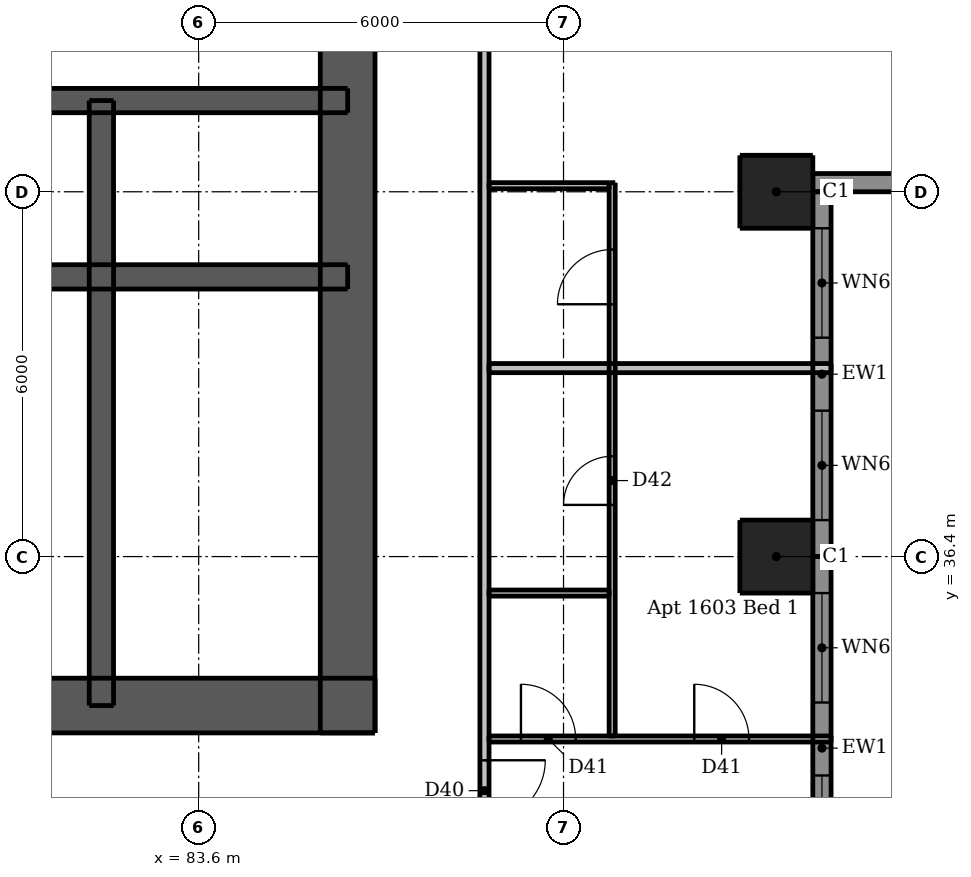
"""IFC4 building model, lengths in metres.
Left out: names, types, materials, properties, quantities, classifications, styles, units other than length and angle.
Written with IfcOpenShell. Run it as: python <this file> out.ifc"""

import sys

from ifc_helpers import new_model, si_unit, direction, frame, frame_2d, origin, origin_2d, place, context, subcontext, project, spatial, rectangle, extrude, element, fill, save


model = new_model("IFC4")
c1 = context("Model", 3, precision=1e-05, world=origin(), true_north=direction((0.0, 1.0)))
c2 = subcontext(c1, "Body", "Model", "MODEL_VIEW")
j1 = project(units=[si_unit("LENGTHUNIT", "METRE"), si_unit("PLANEANGLEUNIT", "RADIAN")], contexts=[c1])
p1 = place(None, origin())
s1 = spatial("IfcSite", under=j1, at=p1, CompositionType="ELEMENT")
p2 = place(p1, origin())
s2 = spatial("IfcBuilding", under=s1, at=p2, CompositionType="ELEMENT")
p3 = place(p2, frame((0.0, 0.0, 59.8)))
s3 = spatial("IfcBuildingStorey", under=s2, at=p3, CompositionType="ELEMENT", Elevation=59.8)
p4 = place(p3, frame((62.5, 33.95, 0.0), z_axis=(0.0, 0.0, 1.0), x_axis=(1.0, 0.0, 0.0)))
e1 = element("IfcWall", 1, at=p4, inside=s3, PredefinedType="SHEAR", context=c2, shape_type="SweptSolid", body=[
    extrude(rectangle(XDim=24.0, YDim=0.9, at=frame_2d((12.0, 0.0))), origin(), (0.0, 0.0, 1.0), 3.05),
])
p5 = place(p4, frame((2.05, 0.0, 0.0)))
e2 = element("IfcOpeningElement", 2, at=p5, cuts=e1, PredefinedType="OPENING", context=c2, shape_type="SweptSolid", body=[
    extrude(rectangle(XDim=1.1, YDim=2.1, at=frame_2d((0.55, 1.05))), frame((0.0, 0.46, 0.0), z_axis=(0.0, -1.0, 0.0), x_axis=(1.0, 0.0, 0.0)), (0.0, 0.0, 1.0), 0.92),
])
p6 = place(p4, frame((20.85, 0.0, 0.0)))
e3 = element("IfcOpeningElement", 3, at=p6, cuts=e1, PredefinedType="OPENING", context=c2, shape_type="SweptSolid", body=[
    extrude(rectangle(XDim=1.1, YDim=2.1, at=frame_2d((0.55, 1.05))), frame((0.0, 0.46, 0.0), z_axis=(0.0, -1.0, 0.0), x_axis=(1.0, 0.0, 0.0)), (0.0, 0.0, 1.0), 0.92),
])
p7 = place(p4, frame((8.0, 0.0, 0.0)))
e4 = element("IfcOpeningElement", 4, at=p7, cuts=e1, PredefinedType="OPENING", context=c2, shape_type="SweptSolid", body=[
    extrude(rectangle(XDim=1.1, YDim=2.1, at=frame_2d((0.55, 1.05))), frame((0.0, 0.46, 0.0), z_axis=(0.0, -1.0, 0.0), x_axis=(1.0, 0.0, 0.0)), (0.0, 0.0, 1.0), 0.92),
])
p8 = place(p4, frame((15.3, 0.0, 0.0)))
e5 = element("IfcOpeningElement", 5, at=p8, cuts=e1, PredefinedType="OPENING", context=c2, shape_type="SweptSolid", body=[
    extrude(rectangle(XDim=0.9, YDim=2.1, at=frame_2d((0.45, 1.05))), frame((0.0, 0.46, 0.0), z_axis=(0.0, -1.0, 0.0), x_axis=(1.0, 0.0, 0.0)), (0.0, 0.0, 1.0), 0.92),
])
p9 = place(p3, frame((86.05, 33.5, 0.0), z_axis=(0.0, 0.0, 1.0), x_axis=(0.0, 1.0, 0.0)))
e6 = element("IfcWall", 6, at=p9, inside=s3, PredefinedType="SHEAR", context=c2, shape_type="SweptSolid", body=[
    extrude(rectangle(XDim=24.0, YDim=0.9, at=frame_2d((12.0, 0.0))), origin(), (0.0, 0.0, 1.0), 3.05),
])
p10 = place(p9, frame((11.2, 0.0, 0.0)))
e7 = element("IfcOpeningElement", 7, at=p10, cuts=e6, PredefinedType="OPENING", context=c2, shape_type="SweptSolid", body=[
    extrude(rectangle(XDim=1.6, YDim=2.1, at=frame_2d((0.8, 1.05))), frame((0.0, 0.46, 0.0), z_axis=(0.0, -1.0, 0.0), x_axis=(1.0, 0.0, 0.0)), (0.0, 0.0, 1.0), 0.92),
])
p11 = place(p3, frame((62.95, 41.0, 0.0), z_axis=(0.0, 0.0, 1.0), x_axis=(1.0, 0.0, 0.0)))
e8 = element("IfcWall", 8, at=p11, inside=s3, PredefinedType="SHEAR", context=c2, shape_type="SweptSolid", body=[
    extrude(rectangle(XDim=23.1, YDim=0.4, at=frame_2d((11.55, 0.0))), origin(), (0.0, 0.0, 1.0), 3.05),
])
p12 = place(p3, frame((62.95, 43.9, 0.0), z_axis=(0.0, 0.0, 1.0), x_axis=(1.0, 0.0, 0.0)))
e9 = element("IfcWall", 9, at=p12, inside=s3, PredefinedType="SHEAR", context=c2, shape_type="SweptSolid", body=[
    extrude(rectangle(XDim=23.1, YDim=0.4, at=frame_2d((11.55, 0.0))), origin(), (0.0, 0.0, 1.0), 3.05),
])
p13 = place(p12, frame((0.662, 0.0, 0.0)))
e10 = element("IfcOpeningElement", 10, at=p13, cuts=e9, PredefinedType="OPENING", context=c2, shape_type="SweptSolid", body=[
    extrude(rectangle(XDim=0.8, YDim=2.1, at=frame_2d((0.4, 1.05))), frame((0.0, 0.21, 0.0), z_axis=(0.0, -1.0, 0.0), x_axis=(1.0, 0.0, 0.0)), (0.0, 0.0, 1.0), 0.42),
])
p14 = place(p12, frame((2.312, 0.0, 0.0)))
e11 = element("IfcOpeningElement", 11, at=p14, cuts=e9, PredefinedType="OPENING", context=c2, shape_type="SweptSolid", body=[
    extrude(rectangle(XDim=0.9, YDim=2.1, at=frame_2d((0.45, 1.05))), frame((0.0, 0.21, 0.0), z_axis=(0.0, -1.0, 0.0), x_axis=(1.0, 0.0, 0.0)), (0.0, 0.0, 1.0), 0.42),
])
p15 = place(p12, frame((20.5, 0.0, 0.0)))
e12 = element("IfcOpeningElement", 12, at=p15, cuts=e9, PredefinedType="OPENING", context=c2, shape_type="SweptSolid", body=[
    extrude(rectangle(XDim=0.9, YDim=2.1, at=frame_2d((0.45, 1.05))), frame((0.0, 0.21, 0.0), z_axis=(0.0, -1.0, 0.0), x_axis=(1.0, 0.0, 0.0)), (0.0, 0.0, 1.0), 0.42),
])
p16 = place(p12, frame((4.75, 0.0, 0.0)))
e13 = element("IfcOpeningElement", 13, at=p16, cuts=e9, PredefinedType="OPENING", context=c2, shape_type="SweptSolid", body=[
    extrude(rectangle(XDim=1.1, YDim=2.1, at=frame_2d((0.55, 1.05))), frame((0.0, 0.21, 0.0), z_axis=(0.0, -1.0, 0.0), x_axis=(1.0, 0.0, 0.0)), (0.0, 0.0, 1.0), 0.42),
])
p17 = place(p12, frame((7.25, 0.0, 0.0)))
e14 = element("IfcOpeningElement", 14, at=p17, cuts=e9, PredefinedType="OPENING", context=c2, shape_type="SweptSolid", body=[
    extrude(rectangle(XDim=1.1, YDim=2.1, at=frame_2d((0.55, 1.05))), frame((0.0, 0.21, 0.0), z_axis=(0.0, -1.0, 0.0), x_axis=(1.0, 0.0, 0.0)), (0.0, 0.0, 1.0), 0.42),
])
p18 = place(p12, frame((9.75, 0.0, 0.0)))
e15 = element("IfcOpeningElement", 15, at=p18, cuts=e9, PredefinedType="OPENING", context=c2, shape_type="SweptSolid", body=[
    extrude(rectangle(XDim=1.1, YDim=2.1, at=frame_2d((0.55, 1.05))), frame((0.0, 0.21, 0.0), z_axis=(0.0, -1.0, 0.0), x_axis=(1.0, 0.0, 0.0)), (0.0, 0.0, 1.0), 0.42),
])
p19 = place(p12, frame((12.25, 0.0, 0.0)))
e16 = element("IfcOpeningElement", 16, at=p19, cuts=e9, PredefinedType="OPENING", context=c2, shape_type="SweptSolid", body=[
    extrude(rectangle(XDim=1.1, YDim=2.1, at=frame_2d((0.55, 1.05))), frame((0.0, 0.21, 0.0), z_axis=(0.0, -1.0, 0.0), x_axis=(1.0, 0.0, 0.0)), (0.0, 0.0, 1.0), 0.42),
])
p20 = place(p12, frame((14.75, 0.0, 0.0)))
e17 = element("IfcOpeningElement", 17, at=p20, cuts=e9, PredefinedType="OPENING", context=c2, shape_type="SweptSolid", body=[
    extrude(rectangle(XDim=1.1, YDim=2.1, at=frame_2d((0.55, 1.05))), frame((0.0, 0.21, 0.0), z_axis=(0.0, -1.0, 0.0), x_axis=(1.0, 0.0, 0.0)), (0.0, 0.0, 1.0), 0.42),
])
p21 = place(p12, frame((17.25, 0.0, 0.0)))
e18 = element("IfcOpeningElement", 18, at=p21, cuts=e9, PredefinedType="OPENING", context=c2, shape_type="SweptSolid", body=[
    extrude(rectangle(XDim=1.1, YDim=2.1, at=frame_2d((0.55, 1.05))), frame((0.0, 0.21, 0.0), z_axis=(0.0, -1.0, 0.0), x_axis=(1.0, 0.0, 0.0)), (0.0, 0.0, 1.0), 0.42),
])
p22 = place(p3, frame((82.0, 33.95, 0.0), z_axis=(0.0, 0.0, 1.0), x_axis=(0.0, 1.0, 0.0)))
e19 = element("IfcWall", 19, at=p22, inside=s3, PredefinedType="SHEAR", context=c2, shape_type="SweptSolid", body=[
    extrude(rectangle(XDim=9.95, YDim=0.4, at=frame_2d((4.975, 0.0))), origin(), (0.0, 0.0, 1.0), 3.05),
])
for number, where, z_axis, x_axis in (
    (20, (93.1, 36.4, 0.0), (0.0, 0.0, 1.0), (1.0, 0.0, 0.0)),
    (21, (93.1, 42.4, 0.0), (0.0, 0.0, 1.0), (1.0, 0.0, 0.0)),
):
    element("IfcColumn", number, at=place(p3, frame(where, z_axis=z_axis, x_axis=x_axis)), inside=s3, PredefinedType="COLUMN", context=c2, shape_type="SweptSolid", body=[
        extrude(rectangle(XDim=1.2, YDim=1.2, at=origin_2d()), origin(), (0.0, 0.0, 1.0), 3.05),
    ])
p23 = place(p3, frame((93.7, 42.55, 0.0), z_axis=(0.0, 0.0, 1.0), x_axis=(1.0, 0.0, 0.0)))
e22 = element("IfcWall", 22, at=p23, inside=s3, PredefinedType="SOLIDWALL", context=c2, shape_type="SweptSolid", body=[
    extrude(rectangle(XDim=4.8, YDim=0.3, at=frame_2d((2.4, 0.0))), origin(), (0.0, 0.0, 1.0), 3.05),
])
p24 = place(p23, frame((1.35, 0.0, 0.15)))
e23 = element("IfcOpeningElement", 23, at=p24, cuts=e22, PredefinedType="OPENING", context=c2, shape_type="SweptSolid", body=[
    extrude(rectangle(XDim=2.4, YDim=2.1, at=frame_2d((1.2, 1.05))), frame((0.0, 0.16, 0.0), z_axis=(0.0, -1.0, 0.0), x_axis=(1.0, 0.0, 0.0)), (0.0, 0.0, 1.0), 0.32),
])
p25 = place(p3, frame((93.85, 30.1, 0.0), z_axis=(0.0, 0.0, 1.0), x_axis=(0.0, 1.0, 0.0)))
e24 = element("IfcWall", 24, at=p25, inside=s3, PredefinedType="SOLIDWALL", context=c2, shape_type="SweptSolid", body=[
    extrude(rectangle(XDim=6.3, YDim=0.3, at=frame_2d((3.15, 0.0))), origin(), (0.0, 0.0, 1.0), 3.05),
])
p26 = place(p25, frame((0.9, 0.0, 0.15)))
e25 = element("IfcOpeningElement", 25, at=p26, cuts=e24, PredefinedType="OPENING", context=c2, shape_type="SweptSolid", body=[
    extrude(rectangle(XDim=1.8, YDim=2.1, at=frame_2d((0.9, 1.05))), frame((0.0, 0.16, 0.0), z_axis=(0.0, -1.0, 0.0), x_axis=(1.0, 0.0, 0.0)), (0.0, 0.0, 1.0), 0.32),
])
p27 = place(p25, frame((3.9, 0.0, 0.15)))
e26 = element("IfcOpeningElement", 26, at=p27, cuts=e24, PredefinedType="OPENING", context=c2, shape_type="SweptSolid", body=[
    extrude(rectangle(XDim=1.8, YDim=2.1, at=frame_2d((0.9, 1.05))), frame((0.0, 0.16, 0.0), z_axis=(0.0, -1.0, 0.0), x_axis=(1.0, 0.0, 0.0)), (0.0, 0.0, 1.0), 0.32),
])
p28 = place(p3, frame((93.85, 36.4, 0.0), z_axis=(0.0, 0.0, 1.0), x_axis=(0.0, 1.0, 0.0)))
e27 = element("IfcWall", 27, at=p28, inside=s3, PredefinedType="SOLIDWALL", context=c2, shape_type="SweptSolid", body=[
    extrude(rectangle(XDim=6.0, YDim=0.3, at=frame_2d((3.0, 0.0))), origin(), (0.0, 0.0, 1.0), 3.05),
])
p29 = place(p28, frame((0.6, 0.0, 0.15)))
e28 = element("IfcOpeningElement", 28, at=p29, cuts=e27, PredefinedType="OPENING", context=c2, shape_type="SweptSolid", body=[
    extrude(rectangle(XDim=1.8, YDim=2.1, at=frame_2d((0.9, 1.05))), frame((0.0, 0.16, 0.0), z_axis=(0.0, -1.0, 0.0), x_axis=(1.0, 0.0, 0.0)), (0.0, 0.0, 1.0), 0.32),
])
p30 = place(p28, frame((3.6, 0.0, 0.15)))
e29 = element("IfcOpeningElement", 29, at=p30, cuts=e27, PredefinedType="OPENING", context=c2, shape_type="SweptSolid", body=[
    extrude(rectangle(XDim=1.8, YDim=2.1, at=frame_2d((0.9, 1.05))), frame((0.0, 0.16, 0.0), z_axis=(0.0, -1.0, 0.0), x_axis=(1.0, 0.0, 0.0)), (0.0, 0.0, 1.0), 0.32),
])
p31 = place(p3, frame((90.4, 33.45, 0.0), z_axis=(0.0, 0.0, 1.0), x_axis=(0.0, 1.0, 0.0)))
e30 = element("IfcWall", 30, at=p31, inside=s3, PredefinedType="PARTITIONING", context=c2, shape_type="SweptSolid", body=[
    extrude(rectangle(XDim=9.1, YDim=0.1, at=frame_2d((4.55, 0.0))), origin(), (0.0, 0.0, 1.0), 3.05),
])
p32 = place(p31, frame((3.8, 0.0, 0.0)))
e31 = element("IfcOpeningElement", 31, at=p32, cuts=e30, PredefinedType="OPENING", context=c2, shape_type="SweptSolid", body=[
    extrude(rectangle(XDim=0.8, YDim=2.1, at=frame_2d((0.4, 1.05))), frame((0.0, 0.06, 0.0), z_axis=(0.0, -1.0, 0.0), x_axis=(1.0, 0.0, 0.0)), (0.0, 0.0, 1.0), 0.12),
])
p33 = place(p31, frame((7.1, 0.0, 0.0)))
e32 = element("IfcOpeningElement", 32, at=p33, cuts=e30, PredefinedType="OPENING", context=c2, shape_type="SweptSolid", body=[
    extrude(rectangle(XDim=0.9, YDim=2.1, at=frame_2d((0.45, 1.05))), frame((0.0, 0.06, 0.0), z_axis=(0.0, -1.0, 0.0), x_axis=(1.0, 0.0, 0.0)), (0.0, 0.0, 1.0), 0.12),
])
p34 = place(p3, frame((88.375, 42.5, 0.0), z_axis=(0.0, 0.0, 1.0), x_axis=(1.0, 0.0, 0.0)))
e33 = element("IfcWall", 33, at=p34, inside=s3, PredefinedType="PARTITIONING", context=c2, shape_type="SweptSolid", body=[
    extrude(rectangle(XDim=1.975, YDim=0.1, at=frame_2d((0.988, 0.0))), origin(), (0.0, 0.0, 1.0), 2.59),
])
p35 = place(p3, frame((88.375, 35.8, 0.0), z_axis=(0.0, 0.0, 1.0), x_axis=(1.0, 0.0, 0.0)))
e34 = element("IfcWall", 34, at=p35, inside=s3, PredefinedType="PARTITIONING", context=c2, shape_type="SweptSolid", body=[
    extrude(rectangle(XDim=1.975, YDim=0.1, at=frame_2d((0.988, 0.0))), origin(), (0.0, 0.0, 1.0), 3.05),
])
p36 = place(p3, frame((88.375, 33.4, 0.0), z_axis=(0.0, 0.0, 1.0), x_axis=(1.0, 0.0, 0.0)))
e35 = element("IfcWall", 35, at=p36, inside=s3, PredefinedType="PARTITIONING", context=c2, shape_type="SweptSolid", body=[
    extrude(rectangle(XDim=5.625, YDim=0.1, at=frame_2d((2.812, 0.0))), origin(), (0.0, 0.0, 1.0), 3.05),
])
p37 = place(p36, frame((0.525, 0.0, 0.0)))
e36 = element("IfcOpeningElement", 36, at=p37, cuts=e35, PredefinedType="OPENING", context=c2, shape_type="SweptSolid", body=[
    extrude(rectangle(XDim=0.9, YDim=2.1, at=frame_2d((0.45, 1.05))), frame((0.0, 0.06, 0.0), z_axis=(0.0, -1.0, 0.0), x_axis=(1.0, 0.0, 0.0)), (0.0, 0.0, 1.0), 0.12),
])
p38 = place(p36, frame((3.375, 0.0, 0.0)))
e37 = element("IfcOpeningElement", 37, at=p38, cuts=e35, PredefinedType="OPENING", context=c2, shape_type="SweptSolid", body=[
    extrude(rectangle(XDim=0.9, YDim=2.1, at=frame_2d((0.45, 1.05))), frame((0.0, 0.06, 0.0), z_axis=(0.0, -1.0, 0.0), x_axis=(1.0, 0.0, 0.0)), (0.0, 0.0, 1.0), 0.12),
])
p39 = place(p3, frame((88.3, 60.475, 0.0), z_axis=(0.0, 0.0, 1.0), x_axis=(0.0, -1.0, 0.0)))
e38 = element("IfcWall", 38, at=p39, inside=s3, PredefinedType="PARTITIONING", context=c2, shape_type="SweptSolid", body=[
    extrude(rectangle(XDim=28.7, YDim=0.15, at=frame_2d((14.35, 0.0))), origin(), (0.0, 0.0, 1.0), 3.05),
])
p40 = place(p39, frame((27.425, 0.0, 0.0)))
e39 = element("IfcOpeningElement", 39, at=p40, cuts=e38, PredefinedType="OPENING", context=c2, shape_type="SweptSolid", body=[
    extrude(rectangle(XDim=1.0, YDim=2.1, at=frame_2d((0.5, 1.05))), frame((0.0, 0.085, 0.0), z_axis=(0.0, -1.0, 0.0), x_axis=(1.0, 0.0, 0.0)), (0.0, 0.0, 1.0), 0.17),
])
p41 = place(p39, frame((14.525, 0.0, 0.0)))
e40 = element("IfcOpeningElement", 40, at=p41, cuts=e38, PredefinedType="OPENING", context=c2, shape_type="SweptSolid", body=[
    extrude(rectangle(XDim=1.0, YDim=2.1, at=frame_2d((0.5, 1.05))), frame((0.0, 0.085, 0.0), z_axis=(0.0, -1.0, 0.0), x_axis=(1.0, 0.0, 0.0)), (0.0, 0.0, 1.0), 0.17),
])
p42 = place(p39, frame((3.775, 0.0, 0.0)))
e41 = element("IfcOpeningElement", 41, at=p42, cuts=e38, PredefinedType="OPENING", context=c2, shape_type="SweptSolid", body=[
    extrude(rectangle(XDim=1.0, YDim=2.1, at=frame_2d((0.5, 1.05))), frame((0.0, 0.085, 0.0), z_axis=(0.0, -1.0, 0.0), x_axis=(1.0, 0.0, 0.0)), (0.0, 0.0, 1.0), 0.17),
])
p43 = place(p3, frame((88.375, 39.5, 0.0), z_axis=(0.0, 0.0, 1.0), x_axis=(1.0, 0.0, 0.0)))
e42 = element("IfcWall", 42, at=p43, inside=s3, PredefinedType="PARTITIONING", context=c2, shape_type="SweptSolid", body=[
    extrude(rectangle(XDim=5.625, YDim=0.15, at=frame_2d((2.812, 0.0))), origin(), (0.0, 0.0, 1.0), 3.05),
])
p44 = place(p26, origin())
e43 = element("IfcWindow", 43, at=p44, inside=s3, PartitioningType="DOUBLE_PANEL_VERTICAL", PredefinedType="WINDOW", context=c2, shape_type="SweptSolid", body=[
    extrude(rectangle(XDim=1.8, YDim=2.1, at=frame_2d((0.9, 1.05))), frame((0.0, 0.03, 0.0), z_axis=(0.0, -1.0, 0.0), x_axis=(1.0, 0.0, 0.0)), (0.0, 0.0, 1.0), 0.06),
])
fill(e25, e43)
p45 = place(p27, origin())
e44 = element("IfcWindow", 44, at=p45, inside=s3, PartitioningType="DOUBLE_PANEL_VERTICAL", PredefinedType="WINDOW", context=c2, shape_type="SweptSolid", body=[
    extrude(rectangle(XDim=1.8, YDim=2.1, at=frame_2d((0.9, 1.05))), frame((0.0, 0.03, 0.0), z_axis=(0.0, -1.0, 0.0), x_axis=(1.0, 0.0, 0.0)), (0.0, 0.0, 1.0), 0.06),
])
fill(e26, e44)
p46 = place(p29, origin())
e45 = element("IfcWindow", 45, at=p46, inside=s3, PartitioningType="DOUBLE_PANEL_VERTICAL", PredefinedType="WINDOW", context=c2, shape_type="SweptSolid", body=[
    extrude(rectangle(XDim=1.8, YDim=2.1, at=frame_2d((0.9, 1.05))), frame((0.0, 0.03, 0.0), z_axis=(0.0, -1.0, 0.0), x_axis=(1.0, 0.0, 0.0)), (0.0, 0.0, 1.0), 0.06),
])
fill(e28, e45)
p47 = place(p30, origin())
e46 = element("IfcWindow", 46, at=p47, inside=s3, PartitioningType="DOUBLE_PANEL_VERTICAL", PredefinedType="WINDOW", context=c2, shape_type="SweptSolid", body=[
    extrude(rectangle(XDim=1.8, YDim=2.1, at=frame_2d((0.9, 1.05))), frame((0.0, 0.03, 0.0), z_axis=(0.0, -1.0, 0.0), x_axis=(1.0, 0.0, 0.0)), (0.0, 0.0, 1.0), 0.06),
])
fill(e29, e46)
p48 = place(p6, origin())
e47 = element("IfcDoor", 47, at=p48, inside=s3, OperationType="SINGLE_SWING_RIGHT", PredefinedType="DOOR", context=c2, shape_type="SweptSolid", body=[
    extrude(rectangle(XDim=1.1, YDim=2.1, at=frame_2d((0.55, 1.05))), frame((0.0, 0.438, 0.0), z_axis=(0.0, -1.0, 0.0), x_axis=(1.0, 0.0, 0.0)), (0.0, 0.0, 1.0), 0.05),
])
fill(e3, e47)
p49 = place(p15, origin())
e48 = element("IfcDoor", 48, at=p49, inside=s3, OperationType="SINGLE_SWING_LEFT", PredefinedType="DOOR", context=c2, shape_type="SweptSolid", body=[
    extrude(rectangle(XDim=0.9, YDim=2.1, at=frame_2d((0.45, 1.05))), frame((0.0, -0.138, 0.0), z_axis=(0.0, -1.0, 0.0), x_axis=(1.0, 0.0, 0.0)), (0.0, 0.0, 1.0), 0.05),
])
fill(e12, e48)
p50 = place(p21, origin())
e49 = element("IfcDoor", 49, at=p50, inside=s3, OperationType="DOUBLE_DOOR_SLIDING", PredefinedType="DOOR", context=c2, shape_type="SweptSolid", body=[
    extrude(rectangle(XDim=1.1, YDim=2.1, at=frame_2d((0.55, 1.05))), frame((0.0, 0.025, 0.0), z_axis=(0.0, -1.0, 0.0), x_axis=(1.0, 0.0, 0.0)), (0.0, 0.0, 1.0), 0.05),
])
fill(e18, e49)
p51 = place(p40, origin())
e50 = element("IfcDoor", 50, at=p51, inside=s3, OperationType="SINGLE_SWING_LEFT", PredefinedType="DOOR", context=c2, shape_type="SweptSolid", body=[
    extrude(rectangle(XDim=1.0, YDim=2.1, at=frame_2d((0.5, 1.05))), frame((0.0, 0.025, 0.0), z_axis=(0.0, -1.0, 0.0), x_axis=(1.0, 0.0, 0.0)), (0.0, 0.0, 1.0), 0.05),
])
fill(e39, e50)
p52 = place(p37, origin())
e51 = element("IfcDoor", 51, at=p52, inside=s3, OperationType="SINGLE_SWING_LEFT", PredefinedType="DOOR", context=c2, shape_type="SweptSolid", body=[
    extrude(rectangle(XDim=0.9, YDim=2.1, at=frame_2d((0.45, 1.05))), frame((0.0, 0.025, 0.0), z_axis=(0.0, -1.0, 0.0), x_axis=(1.0, 0.0, 0.0)), (0.0, 0.0, 1.0), 0.05),
])
fill(e36, e51)
p53 = place(p38, origin())
e52 = element("IfcDoor", 52, at=p53, inside=s3, OperationType="SINGLE_SWING_LEFT", PredefinedType="DOOR", context=c2, shape_type="SweptSolid", body=[
    extrude(rectangle(XDim=0.9, YDim=2.1, at=frame_2d((0.45, 1.05))), frame((0.0, 0.025, 0.0), z_axis=(0.0, -1.0, 0.0), x_axis=(1.0, 0.0, 0.0)), (0.0, 0.0, 1.0), 0.05),
])
fill(e37, e52)
p54 = place(p32, origin())
e53 = element("IfcDoor", 53, at=p54, inside=s3, OperationType="SINGLE_SWING_LEFT", PredefinedType="DOOR", context=c2, shape_type="SweptSolid", body=[
    extrude(rectangle(XDim=0.8, YDim=2.1, at=frame_2d((0.4, 1.05))), frame((0.0, 0.025, 0.0), z_axis=(0.0, -1.0, 0.0), x_axis=(1.0, 0.0, 0.0)), (0.0, 0.0, 1.0), 0.05),
])
fill(e31, e53)
p55 = place(p33, origin())
e54 = element("IfcDoor", 54, at=p55, inside=s3, OperationType="SINGLE_SWING_LEFT", PredefinedType="DOOR", context=c2, shape_type="SweptSolid", body=[
    extrude(rectangle(XDim=0.9, YDim=2.1, at=frame_2d((0.45, 1.05))), frame((0.0, 0.025, 0.0), z_axis=(0.0, -1.0, 0.0), x_axis=(1.0, 0.0, 0.0)), (0.0, 0.0, 1.0), 0.05),
])
fill(e32, e54)
save(model, sys.argv[1])
